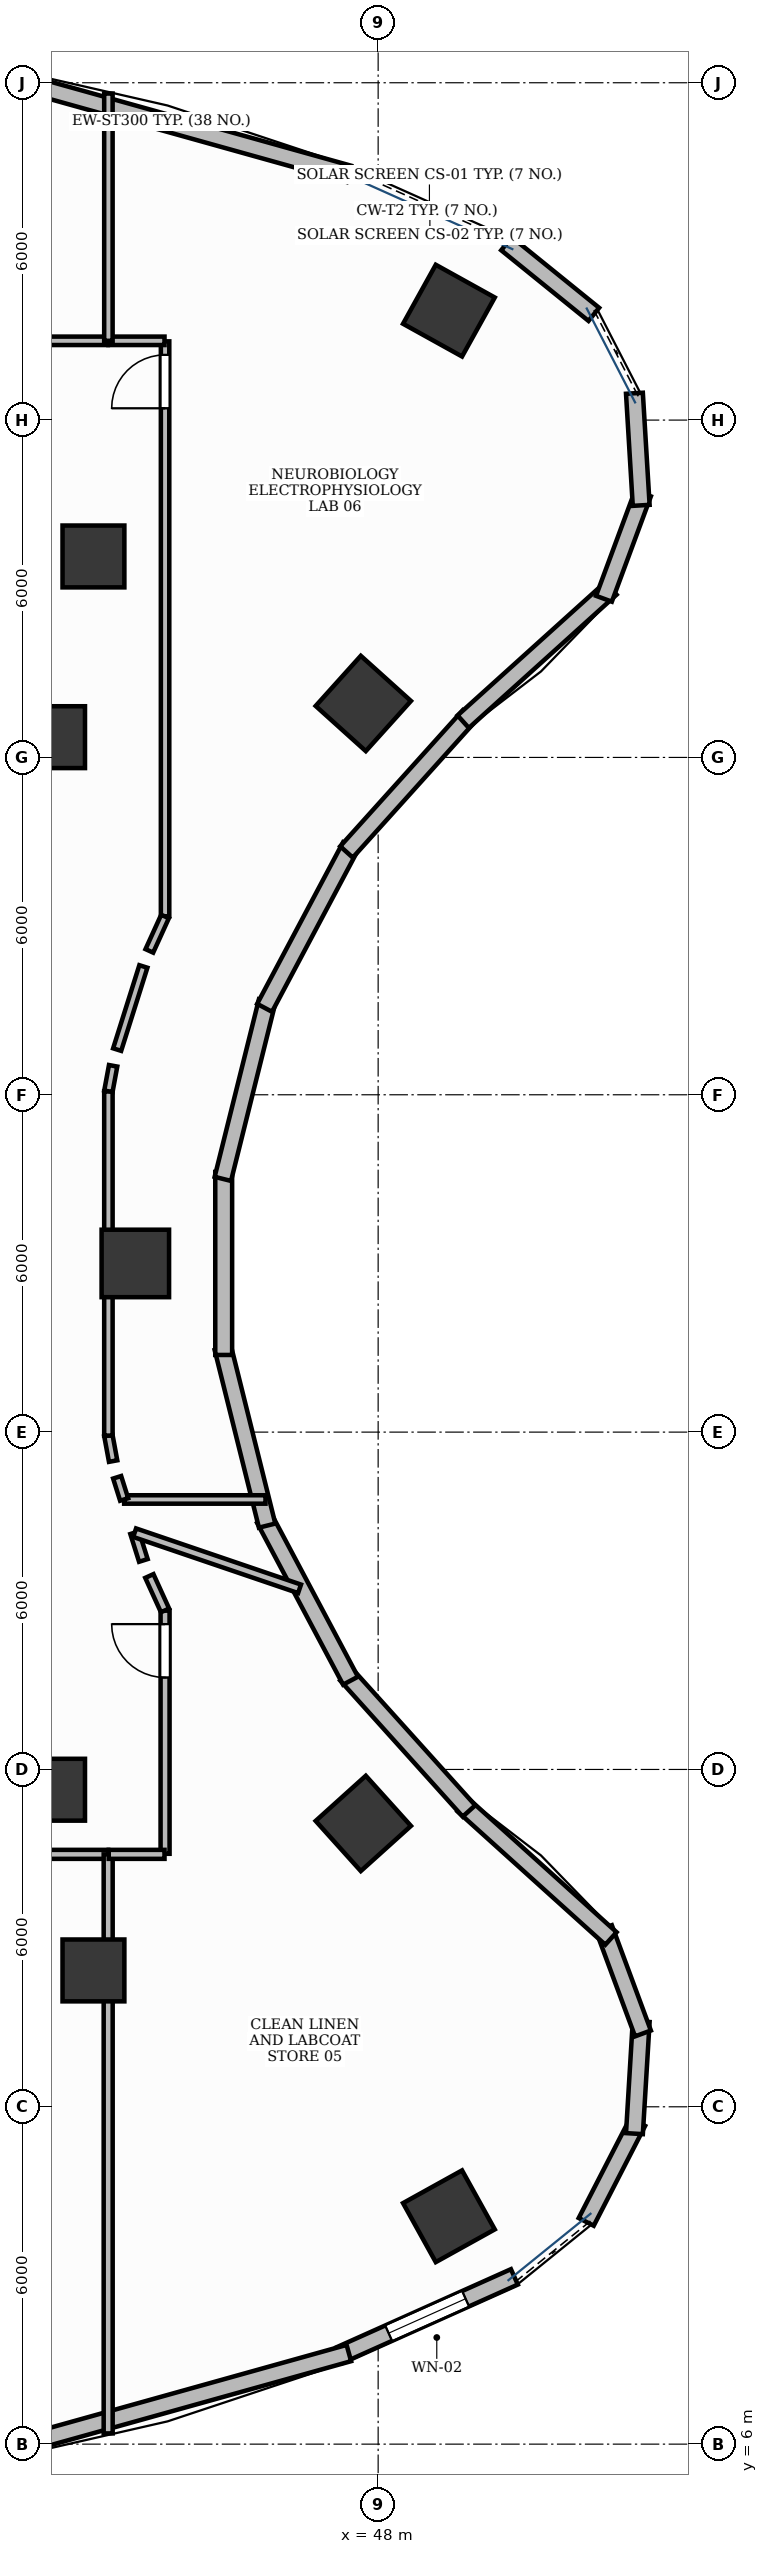
"""IFC4 building model, lengths in metres.
Left out: names, types, materials, properties, quantities, classifications, styles, units other than length and angle.
Written with IfcOpenShell. Run it as: python <this file> out.ifc"""

import sys

from ifc_helpers import new_model, si_unit, direction, frame, frame_2d, origin, origin_2d, place, context, subcontext, project, spatial, rectangle, extrude, element, fill, save


model = new_model("IFC4")
c1 = context("Model", 3, precision=1e-05, world=origin(), true_north=direction((0.0, 1.0)))
c2 = subcontext(c1, "Body", "Model", "MODEL_VIEW")
j1 = project(units=[si_unit("LENGTHUNIT", "METRE"), si_unit("PLANEANGLEUNIT", "RADIAN")], contexts=[c1])
p1 = place(None, origin())
s1 = spatial("IfcSite", under=j1, at=p1, CompositionType="ELEMENT")
p2 = place(p1, origin())
s2 = spatial("IfcBuilding", under=s1, at=p2, CompositionType="ELEMENT")
p3 = place(p2, frame((0.0, 0.0, 140.4)))
s3 = spatial("IfcBuildingStorey", under=s2, at=p3, CompositionType="ELEMENT", Elevation=140.4)
p4 = place(p3, frame((49.259, 43.947, -0.0), z_axis=(0.0, 0.0, 1.0), x_axis=(-0.874535078577, 0.484962262797, 0.0)))
e1 = element("IfcColumn", 1, at=p4, inside=s3, PredefinedType="COLUMN", context=c2, shape_type="SweptSolid", body=[
    extrude(rectangle(XDim=1.2, YDim=1.2, at=origin_2d()), origin(), (0.0, 0.0, 1.0), 3.901),
])
p5 = place(p3, frame((42.936, 39.575, -0.0), z_axis=(0.0, 0.0, 1.0), x_axis=(1.0, 0.0, 0.0)))
e2 = element("IfcColumn", 2, at=p5, inside=s3, PredefinedType="COLUMN", context=c2, shape_type="SweptSolid", body=[
    extrude(rectangle(XDim=1.1, YDim=1.1, at=origin_2d()), origin(), (0.0, 0.0, 1.0), 3.901),
])
p6 = place(p3, frame((49.259, 10.053, -0.0), z_axis=(0.0, 0.0, 1.0), x_axis=(0.874535078577, 0.484962262797, 0.0)))
e3 = element("IfcColumn", 3, at=p6, inside=s3, PredefinedType="COLUMN", context=c2, shape_type="SweptSolid", body=[
    extrude(rectangle(XDim=1.2, YDim=1.2, at=origin_2d()), origin(), (0.0, 0.0, 1.0), 3.901),
])
p7 = place(p3, frame((42.936, 14.425, -0.0), z_axis=(0.0, 0.0, 1.0), x_axis=(1.0, 0.0, 0.0)))
e4 = element("IfcColumn", 4, at=p7, inside=s3, PredefinedType="COLUMN", context=c2, shape_type="SweptSolid", body=[
    extrude(rectangle(XDim=1.1, YDim=1.1, at=origin_2d()), origin(), (0.0, 0.0, 1.0), 3.901),
])
p8 = place(p3, frame((47.736, 17.04, -0.0), z_axis=(0.0, 0.0, 1.0), x_axis=(-0.669130606359, 0.743144825477, 0.0)))
e5 = element("IfcColumn", 5, at=p8, inside=s3, PredefinedType="COLUMN", context=c2, shape_type="SweptSolid", body=[
    extrude(rectangle(XDim=1.2, YDim=1.2, at=origin_2d()), origin(), (0.0, 0.0, 1.0), 3.901),
])
p9 = place(p3, frame((42.236, 17.639, -0.0), z_axis=(0.0, 0.0, 1.0), x_axis=(1.0, 0.0, 0.0)))
e6 = element("IfcColumn", 6, at=p9, inside=s3, PredefinedType="COLUMN", context=c2, shape_type="SweptSolid", body=[
    extrude(rectangle(XDim=1.1, YDim=1.1, at=origin_2d()), origin(), (0.0, 0.0, 1.0), 3.901),
])
for number, where, z_axis, x_axis in (
    (7, (43.681, 27.0, -0.0), (0.0, 0.0, 1.0), (0.0, 1.0, 0.0)),
    (8, (47.736, 36.96, -0.0), (0.0, 0.0, 1.0), (0.669, 0.743, 0.0)),
):
    element("IfcColumn", number, at=place(p3, frame(where, z_axis=z_axis, x_axis=x_axis)), inside=s3, PredefinedType="COLUMN", context=c2, shape_type="SweptSolid", body=[
        extrude(rectangle(XDim=1.2, YDim=1.2, at=origin_2d()), origin(), (0.0, 0.0, 1.0), 3.901),
    ])
p10 = place(p3, frame((42.236, 36.361, -0.0), z_axis=(0.0, 0.0, 1.0), x_axis=(1.0, 0.0, 0.0)))
e9 = element("IfcColumn", 9, at=p10, inside=s3, PredefinedType="COLUMN", context=c2, shape_type="SweptSolid", body=[
    extrude(rectangle(XDim=1.1, YDim=1.1, at=origin_2d()), origin(), (0.0, 0.0, 1.0), 3.901),
])
p11 = place(p3, frame((47.319, 7.585, 0.0), z_axis=(0.0, 0.0, 1.0), x_axis=(0.912680179498, 0.40867455261, 0.0)))
e10 = element("IfcWall", 10, at=p11, inside=s3, PredefinedType="STANDARD", context=c2, shape_type="SweptSolid", body=[
    extrude(rectangle(XDim=3.401, YDim=0.3, at=frame_2d((1.7, 0.0))), origin(), (0.0, 0.0, 1.0), 3.9),
])
p12 = place(p11, frame((0.95, 0.0, 0.95)))
e11 = element("IfcOpeningElement", 11, at=p12, cuts=e10, PredefinedType="OPENING", context=c2, shape_type="SweptSolid", body=[
    extrude(rectangle(XDim=1.5, YDim=1.8, at=frame_2d((0.75, 0.9))), frame((0.0, 0.165, 0.0), z_axis=(0.0, -1.0, 0.0), x_axis=(1.0, 0.0, 0.0)), (0.0, 0.0, 1.0), 0.33),
])
for number, where, z_axis, x_axis in (
    (12, (47.479, 46.38, 0.0), (0.0, 0.0, 1.0), (-0.963, 0.269, 0.0)),
    (13, (40.811, 5.757, 0.0), (0.0, 0.0, 1.0), (0.963, 0.269, 0.0)),
):
    element("IfcWall", number, at=place(p3, frame(where, z_axis=z_axis, x_axis=x_axis)), inside=s3, PredefinedType="STANDARD", context=c2, shape_type="SweptSolid", body=[
        extrude(rectangle(XDim=6.924, YDim=0.3, at=frame_2d((3.462, 0.0))), origin(), (0.0, 0.0, 1.0), 3.9),
    ])
for number, where, z_axis, x_axis in (
    (14, (51.701, 9.953, 0.0), (0.0, 0.0, 1.0), (0.458, 0.889, 0.0)),
    (15, (52.559, 11.523, 0.0), (0.0, 0.0, 1.0), (0.06, 0.998, 0.0)),
):
    element("IfcWall", number, at=place(p3, frame(where, z_axis=z_axis, x_axis=x_axis)), inside=s3, PredefinedType="STANDARD", context=c2, shape_type="SweptSolid", body=[
        extrude(rectangle(XDim=1.998, YDim=0.3, at=frame_2d((0.999, 0.0))), origin(), (0.0, 0.0, 1.0), 3.9),
    ])
p13 = place(p3, frame((52.71, 13.305, 0.0), z_axis=(0.0, 0.0, 1.0), x_axis=(-0.347370087337, 0.937728117539, 0.0)))
e16 = element("IfcWall", 16, at=p13, inside=s3, PredefinedType="STANDARD", context=c2, shape_type="SweptSolid", body=[
    extrude(rectangle(XDim=1.997, YDim=0.3, at=frame_2d((0.999, 0.0))), origin(), (0.0, 0.0, 1.0), 3.9),
])
p14 = place(p3, frame((52.141, 14.994, 0.0), z_axis=(0.0, 0.0, 1.0), x_axis=(-0.74255963233, 0.669779958221, 0.0)))
e17 = element("IfcWall", 17, at=p14, inside=s3, PredefinedType="STANDARD", context=c2, shape_type="SweptSolid", body=[
    extrude(rectangle(XDim=3.539, YDim=0.3, at=frame_2d((1.77, 0.0))), origin(), (0.0, 0.0, 1.0), 3.9),
])
p15 = place(p3, frame((49.616, 17.262, 0.0), z_axis=(0.0, 0.0, 1.0), x_axis=(-0.669167727967, 0.743111399353, 0.0)))
e18 = element("IfcWall", 18, at=p15, inside=s3, PredefinedType="STANDARD", context=c2, shape_type="SweptSolid", body=[
    extrude(rectangle(XDim=3.255, YDim=0.3, at=frame_2d((1.628, 0.0))), origin(), (0.0, 0.0, 1.0), 3.9),
])
p16 = place(p3, frame((47.509, 19.579, 0.0), z_axis=(0.0, 0.0, 1.0), x_axis=(-0.469451284634, 0.882958374645, 0.0)))
e19 = element("IfcWall", 19, at=p16, inside=s3, PredefinedType="STANDARD", context=c2, shape_type="SweptSolid", body=[
    extrude(rectangle(XDim=3.256, YDim=0.3, at=frame_2d((1.628, 0.0))), origin(), (0.0, 0.0, 1.0), 3.9),
])
p17 = place(p3, frame((46.025, 22.337, 0.0), z_axis=(0.0, 0.0, 1.0), x_axis=(-0.241900409149, 0.970301083197, 0.0)))
e20 = element("IfcWall", 20, at=p17, inside=s3, PredefinedType="STANDARD", context=c2, shape_type="SweptSolid", body=[
    extrude(rectangle(XDim=3.256, YDim=0.3, at=frame_2d((1.628, 0.0))), origin(), (0.0, 0.0, 1.0), 3.9),
])
p18 = place(p3, frame((45.253, 25.372, 0.0), z_axis=(0.0, 0.0, 1.0), x_axis=(0.0, 1.0, 0.0)))
e21 = element("IfcWall", 21, at=p18, inside=s3, PredefinedType="STANDARD", context=c2, shape_type="SweptSolid", body=[
    extrude(rectangle(XDim=3.255, YDim=0.3, at=frame_2d((1.628, 0.0))), origin(), (0.0, 0.0, 1.0), 3.9),
])
p19 = place(p3, frame((45.238, 28.504, 0.0), z_axis=(0.0, 0.0, 1.0), x_axis=(0.241900409149, 0.970301083197, 0.0)))
e22 = element("IfcWall", 22, at=p19, inside=s3, PredefinedType="STANDARD", context=c2, shape_type="SweptSolid", body=[
    extrude(rectangle(XDim=3.256, YDim=0.3, at=frame_2d((1.628, 0.0))), origin(), (0.0, 0.0, 1.0), 3.9),
])
p20 = place(p3, frame((45.98, 31.547, 0.0), z_axis=(0.0, 0.0, 1.0), x_axis=(0.469451284634, 0.882958374645, 0.0)))
e23 = element("IfcWall", 23, at=p20, inside=s3, PredefinedType="STANDARD", context=c2, shape_type="SweptSolid", body=[
    extrude(rectangle(XDim=3.256, YDim=0.3, at=frame_2d((1.628, 0.0))), origin(), (0.0, 0.0, 1.0), 3.9),
])
p21 = place(p3, frame((47.437, 34.319, 0.0), z_axis=(0.0, 0.0, 1.0), x_axis=(0.669167727967, 0.743111399353, 0.0)))
e24 = element("IfcWall", 24, at=p21, inside=s3, PredefinedType="STANDARD", context=c2, shape_type="SweptSolid", body=[
    extrude(rectangle(XDim=3.255, YDim=0.3, at=frame_2d((1.628, 0.0))), origin(), (0.0, 0.0, 1.0), 3.9),
])
p22 = place(p3, frame((49.513, 36.636, 0.0), z_axis=(0.0, 0.0, 1.0), x_axis=(0.74255963233, 0.669779958221, 0.0)))
e25 = element("IfcWall", 25, at=p22, inside=s3, PredefinedType="STANDARD", context=c2, shape_type="SweptSolid", body=[
    extrude(rectangle(XDim=3.539, YDim=0.3, at=frame_2d((1.77, 0.0))), origin(), (0.0, 0.0, 1.0), 3.9),
])
p23 = place(p3, frame((52.016, 38.822, 0.0), z_axis=(0.0, 0.0, 1.0), x_axis=(0.347370087337, 0.937728117539, 0.0)))
e26 = element("IfcWall", 26, at=p23, inside=s3, PredefinedType="STANDARD", context=c2, shape_type="SweptSolid", body=[
    extrude(rectangle(XDim=1.997, YDim=0.3, at=frame_2d((0.999, 0.0))), origin(), (0.0, 0.0, 1.0), 3.9),
])
for number, where, z_axis, x_axis in (
    (27, (52.679, 40.483, 0.0), (0.0, 0.0, 1.0), (-0.06, 0.998, 0.0)),
    (28, (51.836, 43.881, 0.0), (0.0, 0.0, 1.0), (-0.777, 0.629, 0.0)),
):
    element("IfcWall", number, at=place(p3, frame(where, z_axis=z_axis, x_axis=x_axis)), inside=s3, PredefinedType="STANDARD", context=c2, shape_type="SweptSolid", body=[
        extrude(rectangle(XDim=1.998, YDim=0.3, at=frame_2d((0.999, 0.0))), origin(), (0.0, 0.0, 1.0), 3.9),
    ])
p24 = place(p3, frame((44.21, 16.5, 0.0), z_axis=(0.0, 0.0, 1.0), x_axis=(0.0, 1.0, 0.0)))
e29 = element("IfcWall", 29, at=p24, inside=s3, PredefinedType="PARTITIONING", context=c2, shape_type="SweptSolid", body=[
    extrude(rectangle(XDim=4.325, YDim=0.16, at=frame_2d((2.163, 0.0))), origin(), (0.0, 0.0, 1.0), 2.91),
])
p25 = place(p24, frame((3.135, 0.0, 0.0)))
e30 = element("IfcOpeningElement", 30, at=p25, cuts=e29, PredefinedType="OPENING", context=c2, shape_type="SweptSolid", body=[
    extrude(rectangle(XDim=0.95, YDim=2.15, at=frame_2d((0.475, 1.075))), frame((0.0, 0.095, 0.0), z_axis=(0.0, -1.0, 0.0), x_axis=(1.0, 0.0, 0.0)), (0.0, 0.0, 1.0), 0.19),
])
p26 = place(p3, frame((44.21, 33.175, 0.0), z_axis=(0.0, 0.0, 1.0), x_axis=(0.0, 1.0, 0.0)))
e31 = element("IfcWall", 31, at=p26, inside=s3, PredefinedType="PARTITIONING", context=c2, shape_type="SweptSolid", body=[
    extrude(rectangle(XDim=10.225, YDim=0.15, at=frame_2d((5.112, 0.0))), origin(), (0.0, 0.0, 1.0), 2.91),
])
p27 = place(p26, frame((9.035, 0.0, 0.0)))
e32 = element("IfcOpeningElement", 32, at=p27, cuts=e31, PredefinedType="OPENING", context=c2, shape_type="SweptSolid", body=[
    extrude(rectangle(XDim=0.95, YDim=2.15, at=frame_2d((0.475, 1.075))), frame((0.0, 0.09, 0.0), z_axis=(0.0, -1.0, 0.0), x_axis=(1.0, 0.0, 0.0)), (0.0, 0.0, 1.0), 0.18),
])
p28 = place(p3, frame((43.192, 43.41, 0.0), z_axis=(0.0, 0.0, 1.0), x_axis=(-1.0, 0.0, 0.0)))
e33 = element("IfcWall", 33, at=p28, inside=s3, PredefinedType="PARTITIONING", context=c2, shape_type="SweptSolid", body=[
    extrude(rectangle(XDim=11.973, YDim=0.15, at=frame_2d((5.987, 0.0))), origin(), (0.0, 0.0, 1.0), 2.91),
])
p29 = place(p28, frame((7.15, 0.0, 0.0)))
e34 = element("IfcOpeningElement", 34, at=p29, cuts=e33, PredefinedType="OPENING", context=c2, shape_type="SweptSolid", body=[
    extrude(rectangle(XDim=0.95, YDim=2.15, at=frame_2d((0.475, 1.075))), frame((0.0, 0.09, 0.0), z_axis=(0.0, -1.0, 0.0), x_axis=(1.0, 0.0, 0.0)), (0.0, 0.0, 1.0), 0.18),
])
p30 = place(p3, frame((40.4, 16.49, 0.0), z_axis=(0.0, 0.0, 1.0), x_axis=(1.0, 0.0, 0.0)))
e35 = element("IfcWall", 35, at=p30, inside=s3, PredefinedType="PARTITIONING", context=c2, shape_type="SweptSolid", body=[
    extrude(rectangle(XDim=2.798, YDim=0.16, at=frame_2d((1.399, 0.0))), origin(), (0.0, 0.0, 1.0), 2.91),
])
p31 = place(p3, frame((43.198, 16.49, 0.0), z_axis=(0.0, 0.0, 1.0), x_axis=(0.0, -1.0, 0.0)))
e36 = element("IfcWall", 36, at=p31, inside=s3, PredefinedType="PARTITIONING", context=c2, shape_type="SweptSolid", body=[
    extrude(rectangle(XDim=1.838, YDim=0.16, at=frame_2d((0.919, 0.0))), origin(), (0.0, 0.0, 1.0), 2.91),
])
p32 = place(p3, frame((43.198, 14.648, 0.0), z_axis=(0.0, 0.0, 1.0), x_axis=(0.0, -1.0, 0.0)))
e37 = element("IfcWall", 37, at=p32, inside=s3, PredefinedType="PARTITIONING", context=c2, shape_type="SweptSolid", body=[
    extrude(rectangle(XDim=8.457, YDim=0.16, at=frame_2d((4.229, 0.0))), origin(), (0.0, 0.0, 1.0), 2.91),
])
p33 = place(p3, frame((43.208, 16.49, 0.0), z_axis=(0.0, 0.0, 1.0), x_axis=(1.0, 0.0, 0.0)))
e38 = element("IfcWall", 38, at=p33, inside=s3, PredefinedType="PARTITIONING", context=c2, shape_type="SweptSolid", body=[
    extrude(rectangle(XDim=0.992, YDim=0.16, at=frame_2d((0.496, 0.0))), origin(), (0.0, 0.0, 1.0), 2.91),
])
p34 = place(p3, frame((44.209, 20.829, 0.0), z_axis=(0.0, 0.0, 1.0), x_axis=(-0.414377467152, 0.910105111905, 0.0)))
e39 = element("IfcWall", 39, at=p34, inside=s3, PredefinedType="PARTITIONING", context=c2, shape_type="SweptSolid", body=[
    extrude(rectangle(XDim=0.672, YDim=0.16, at=frame_2d((0.336, 0.0))), origin(), (0.0, 0.0, 1.0), 2.91),
])
p35 = place(p3, frame((43.824, 21.718, 0.0), z_axis=(0.0, 0.0, 1.0), x_axis=(-0.300747217066, 0.953703890852, 0.0)))
e40 = element("IfcWall", 40, at=p35, inside=s3, PredefinedType="PARTITIONING", context=c2, shape_type="SweptSolid", body=[
    extrude(rectangle(XDim=0.517, YDim=0.16, at=frame_2d((0.259, 0.0))), origin(), (0.0, 0.0, 1.0), 2.91),
])
p36 = place(p3, frame((43.668, 22.211, 0.0), z_axis=(0.0, 0.0, 1.0), x_axis=(0.946663200968, -0.322224741342, 0.0)))
e41 = element("IfcWall", 41, at=p36, inside=s3, PredefinedType="PARTITIONING", context=c2, shape_type="SweptSolid", body=[
    extrude(rectangle(XDim=3.099, YDim=0.16, at=frame_2d((1.549, 0.0))), origin(), (0.0, 0.0, 1.0), 2.91),
])
p37 = place(p3, frame((43.202, 27.168, 0.0), z_axis=(0.0, 0.0, 1.0), x_axis=(0.0, 1.0, 0.0)))
e42 = element("IfcWall", 42, at=p37, inside=s3, PredefinedType="PARTITIONING", context=c2, shape_type="SweptSolid", body=[
    extrude(rectangle(XDim=2.894, YDim=0.15, at=frame_2d((1.447, 0.0))), origin(), (0.0, 0.0, 1.0), 2.91),
])
p38 = place(p3, frame((43.202, 30.062, 0.0), z_axis=(0.0, 0.0, 1.0), x_axis=(0.182241022482, 0.983253888741, 0.0)))
e43 = element("IfcWall", 43, at=p38, inside=s3, PredefinedType="PARTITIONING", context=c2, shape_type="SweptSolid", body=[
    extrude(rectangle(XDim=0.461, YDim=0.15, at=frame_2d((0.23, 0.0))), origin(), (0.0, 0.0, 1.0), 2.91),
])
p39 = place(p3, frame((43.358, 30.803, 0.0), z_axis=(0.0, 0.0, 1.0), x_axis=(0.300641414783, 0.953737248783, 0.0)))
e44 = element("IfcWall", 44, at=p39, inside=s3, PredefinedType="PARTITIONING", context=c2, shape_type="SweptSolid", body=[
    extrude(rectangle(XDim=1.55, YDim=0.15, at=frame_2d((0.775, 0.0))), origin(), (0.0, 0.0, 1.0), 2.91),
])
p40 = place(p3, frame((43.93, 32.559, 0.0), z_axis=(0.0, 0.0, 1.0), x_axis=(0.414377467152, 0.910105111905, 0.0)))
e45 = element("IfcWall", 45, at=p40, inside=s3, PredefinedType="PARTITIONING", context=c2, shape_type="SweptSolid", body=[
    extrude(rectangle(XDim=0.672, YDim=0.15, at=frame_2d((0.336, 0.0))), origin(), (0.0, 0.0, 1.0), 2.91),
])
p41 = place(p3, frame((44.2, 43.41, 0.0), z_axis=(0.0, 0.0, 1.0), x_axis=(-1.0, 0.0, 0.0)))
e46 = element("IfcWall", 46, at=p41, inside=s3, PredefinedType="PARTITIONING", context=c2, shape_type="SweptSolid", body=[
    extrude(rectangle(XDim=0.998, YDim=0.15, at=frame_2d((0.499, 0.0))), origin(), (0.0, 0.0, 1.0), 2.91),
])
p42 = place(p3, frame((43.202, 43.41, 0.0), z_axis=(0.0, 0.0, 1.0), x_axis=(0.0, 1.0, 0.0)))
e47 = element("IfcWall", 47, at=p42, inside=s3, PredefinedType="PARTITIONING", context=c2, shape_type="SweptSolid", body=[
    extrude(rectangle(XDim=4.398, YDim=0.15, at=frame_2d((2.199, 0.0))), origin(), (0.0, 0.0, 1.0), 2.91),
])
p43 = place(p3, frame((45.996, 22.802, 0.0), z_axis=(0.0, 0.0, 1.0), x_axis=(-1.0, 0.0, 0.0)))
e48 = element("IfcWall", 48, at=p43, inside=s3, PredefinedType="PARTITIONING", context=c2, shape_type="SweptSolid", body=[
    extrude(rectangle(XDim=2.514, YDim=0.15, at=frame_2d((1.257, 0.0))), origin(), (0.0, 0.0, 1.0), 2.91),
])
p44 = place(p3, frame((43.482, 22.802, 0.0), z_axis=(0.0, 0.0, 1.0), x_axis=(-0.300425095419, 0.953805410995, 0.0)))
e49 = element("IfcWall", 49, at=p44, inside=s3, PredefinedType="PARTITIONING", context=c2, shape_type="SweptSolid", body=[
    extrude(rectangle(XDim=0.414, YDim=0.15, at=frame_2d((0.207, 0.0))), origin(), (0.0, 0.0, 1.0), 2.91),
])
p45 = place(p3, frame((43.286, 23.485, 0.0), z_axis=(0.0, 0.0, 1.0), x_axis=(-0.182241022482, 0.983253888741, 0.0)))
e50 = element("IfcWall", 50, at=p45, inside=s3, PredefinedType="PARTITIONING", context=c2, shape_type="SweptSolid", body=[
    extrude(rectangle(XDim=0.461, YDim=0.15, at=frame_2d((0.23, 0.0))), origin(), (0.0, 0.0, 1.0), 2.91),
])
p46 = place(p3, frame((43.202, 23.938, 0.0), z_axis=(0.0, 0.0, 1.0), x_axis=(0.0, 1.0, 0.0)))
e51 = element("IfcWall", 51, at=p46, inside=s3, PredefinedType="PARTITIONING", context=c2, shape_type="SweptSolid", body=[
    extrude(rectangle(XDim=3.226, YDim=0.15, at=frame_2d((1.613, 0.0))), origin(), (0.0, 0.0, 1.0), 2.91),
])
p47 = place(p12, origin())
e52 = element("IfcWindow", 52, at=p47, inside=s3, PartitioningType="DOUBLE_PANEL_VERTICAL", PredefinedType="WINDOW", context=c2, shape_type="SweptSolid", body=[
    extrude(rectangle(XDim=1.5, YDim=1.8, at=frame_2d((0.75, 0.9))), frame((0.0, 0.03, 0.0), z_axis=(0.0, -1.0, 0.0), x_axis=(1.0, 0.0, 0.0)), (0.0, 0.0, 1.0), 0.06),
])
fill(e11, e52)
p48 = place(p25, origin())
e53 = element("IfcDoor", 53, at=p48, inside=s3, OperationType="SINGLE_SWING_RIGHT", PredefinedType="DOOR", context=c2, shape_type="SweptSolid", body=[
    extrude(rectangle(XDim=0.95, YDim=2.15, at=frame_2d((0.475, 1.075))), frame((0.0, 0.025, 0.0), z_axis=(0.0, -1.0, 0.0), x_axis=(1.0, 0.0, 0.0)), (0.0, 0.0, 1.0), 0.05),
])
fill(e30, e53)
p49 = place(p27, origin())
e54 = element("IfcDoor", 54, at=p49, inside=s3, OperationType="SINGLE_SWING_LEFT", PredefinedType="DOOR", context=c2, shape_type="SweptSolid", body=[
    extrude(rectangle(XDim=0.95, YDim=2.15, at=frame_2d((0.475, 1.075))), frame((0.0, 0.025, 0.0), z_axis=(0.0, -1.0, 0.0), x_axis=(1.0, 0.0, 0.0)), (0.0, 0.0, 1.0), 0.05),
])
fill(e32, e54)
save(model, sys.argv[1])
